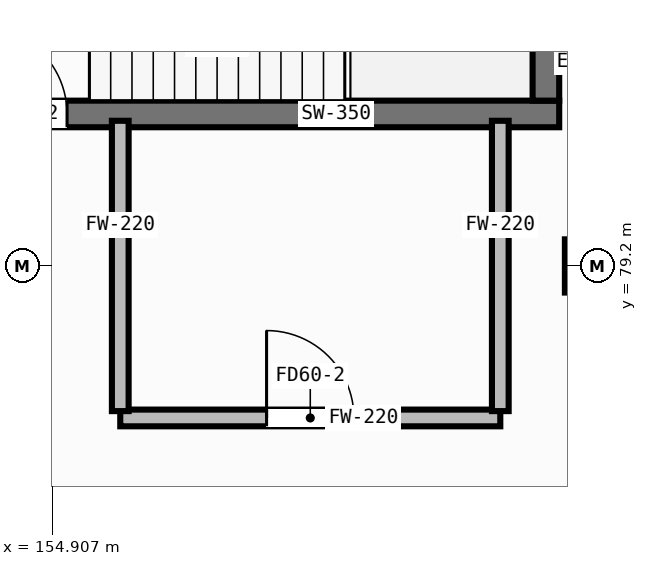
"""IFC4 building model, lengths in metres.
Left out: names, types, materials, properties, quantities, classifications, styles, units other than length and angle.
Written with IfcOpenShell. Run it as: python <this file> out.ifc"""

import sys

from ifc_helpers import new_model, si_unit, direction, frame, frame_2d, origin, origin_2d, place, context, subcontext, project, spatial, rectangle, hollow_rectangle, extrude, element, fill, save


model = new_model("IFC4")
c1 = context("Model", 3, precision=1e-05, world=origin(), true_north=direction((0.0, 1.0)))
c2 = subcontext(c1, "Body", "Model", "MODEL_VIEW")
j1 = project(units=[si_unit("LENGTHUNIT", "METRE"), si_unit("PLANEANGLEUNIT", "RADIAN")], contexts=[c1])
p1 = place(None, origin())
s1 = spatial("IfcSite", under=j1, at=p1, CompositionType="ELEMENT")
p2 = place(p1, origin())
s2 = spatial("IfcBuilding", under=s1, at=p2, CompositionType="ELEMENT")
p3 = place(p2, frame((0.0, 0.0, 4.8)))
s3 = spatial("IfcBuildingStorey", under=s2, at=p3, CompositionType="ELEMENT", Elevation=4.8)
p4 = place(p3, frame((162.0, 79.2, 0.0), z_axis=(0.0, 0.0, 1.0), x_axis=(1.0, 0.0, 0.0)))
e1 = element("IfcColumn", 1, at=p4, inside=s3, PredefinedType="COLUMN", context=c2, shape_type="SweptSolid", body=[
    extrude(hollow_rectangle(XDim=0.7, YDim=0.7, WallThickness=0.028, at=origin_2d()), origin(), (0.0, 0.0, 1.0), 4.0),
])
p5 = place(p3, frame((153.425, 81.2, 0.0), z_axis=(0.0, 0.0, 1.0), x_axis=(1.0, 0.0, 0.0)))
e2 = element("IfcWall", 2, at=p5, inside=s3, PredefinedType="SHEAR", context=c2, shape_type="SweptSolid", body=[
    extrude(rectangle(XDim=8.15, YDim=0.35, at=frame_2d((4.075, 0.0))), origin(), (0.0, 0.0, 1.0), 3.755),
])
p6 = place(p5, frame((0.525, 0.0, 0.0)))
e3 = element("IfcOpeningElement", 3, at=p6, cuts=e2, PredefinedType="OPENING", context=c2, shape_type="SweptSolid", body=[
    extrude(rectangle(XDim=1.15, YDim=2.1, at=frame_2d((0.575, 1.05))), frame((0.0, 0.187, 0.0), z_axis=(0.0, -1.0, 0.0), x_axis=(1.0, 0.0, 0.0)), (0.0, 0.0, 1.0), 0.374),
])
p7 = place(p3, frame((161.4, 81.375, 0.0), z_axis=(0.0, 0.0, 1.0), x_axis=(0.0, 1.0, 0.0)))
e4 = element("IfcWall", 4, at=p7, inside=s3, PredefinedType="SHEAR", context=c2, shape_type="SweptSolid", body=[
    extrude(rectangle(XDim=3.55, YDim=0.35, at=frame_2d((1.775, 0.0))), origin(), (0.0, 0.0, 1.0), 3.755),
])
p8 = place(p3, frame((155.8, 77.2, 0.0), z_axis=(0.0, 0.0, 1.0), x_axis=(1.0, 0.0, 0.0)))
e5 = element("IfcWall", 5, at=p8, inside=s3, PredefinedType="PARTITIONING", context=c2, shape_type="SweptSolid", body=[
    extrude(rectangle(XDim=5.0, YDim=0.22, at=frame_2d((2.5, 0.0))), origin(), (0.0, 0.0, 1.0), 3.755),
])
p9 = place(p8, frame((1.925, 0.0, 0.0)))
e6 = element("IfcOpeningElement", 6, at=p9, cuts=e5, PredefinedType="OPENING", context=c2, shape_type="SweptSolid", body=[
    extrude(rectangle(XDim=1.15, YDim=2.1, at=frame_2d((0.575, 1.05))), frame((0.0, 0.122, 0.0), z_axis=(0.0, -1.0, 0.0), x_axis=(1.0, 0.0, 0.0)), (0.0, 0.0, 1.0), 0.244),
])
for number, where, z_axis, x_axis in (
    (7, (155.8, 77.29, 0.0), (0.0, 0.0, 1.0), (0.0, 1.0, 0.0)),
    (8, (160.8, 77.29, 0.0), (0.0, 0.0, 1.0), (0.0, 1.0, 0.0)),
):
    element("IfcWall", number, at=place(p3, frame(where, z_axis=z_axis, x_axis=x_axis)), inside=s3, PredefinedType="PARTITIONING", context=c2, shape_type="SweptSolid", body=[
        extrude(rectangle(XDim=3.82, YDim=0.22, at=frame_2d((1.91, 0.0))), origin(), (0.0, 0.0, 1.0), 3.755),
    ])
p10 = place(p6, origin())
e9 = element("IfcDoor", 9, at=p10, inside=s3, OperationType="SINGLE_SWING_LEFT", PredefinedType="DOOR", context=c2, shape_type="SweptSolid", body=[
    extrude(rectangle(XDim=1.15, YDim=2.1, at=frame_2d((0.575, 1.05))), frame((0.0, 0.025, 0.0), z_axis=(0.0, -1.0, 0.0), x_axis=(1.0, 0.0, 0.0)), (0.0, 0.0, 1.0), 0.05),
])
fill(e3, e9)
p11 = place(p9, origin())
e10 = element("IfcDoor", 10, at=p11, inside=s3, OperationType="SINGLE_SWING_LEFT", PredefinedType="DOOR", context=c2, shape_type="SweptSolid", body=[
    extrude(rectangle(XDim=1.15, YDim=2.1, at=frame_2d((0.575, 1.05))), frame((0.0, 0.025, 0.0), z_axis=(0.0, -1.0, 0.0), x_axis=(1.0, 0.0, 0.0)), (0.0, 0.0, 1.0), 0.05),
])
fill(e6, e10)
save(model, sys.argv[1])
